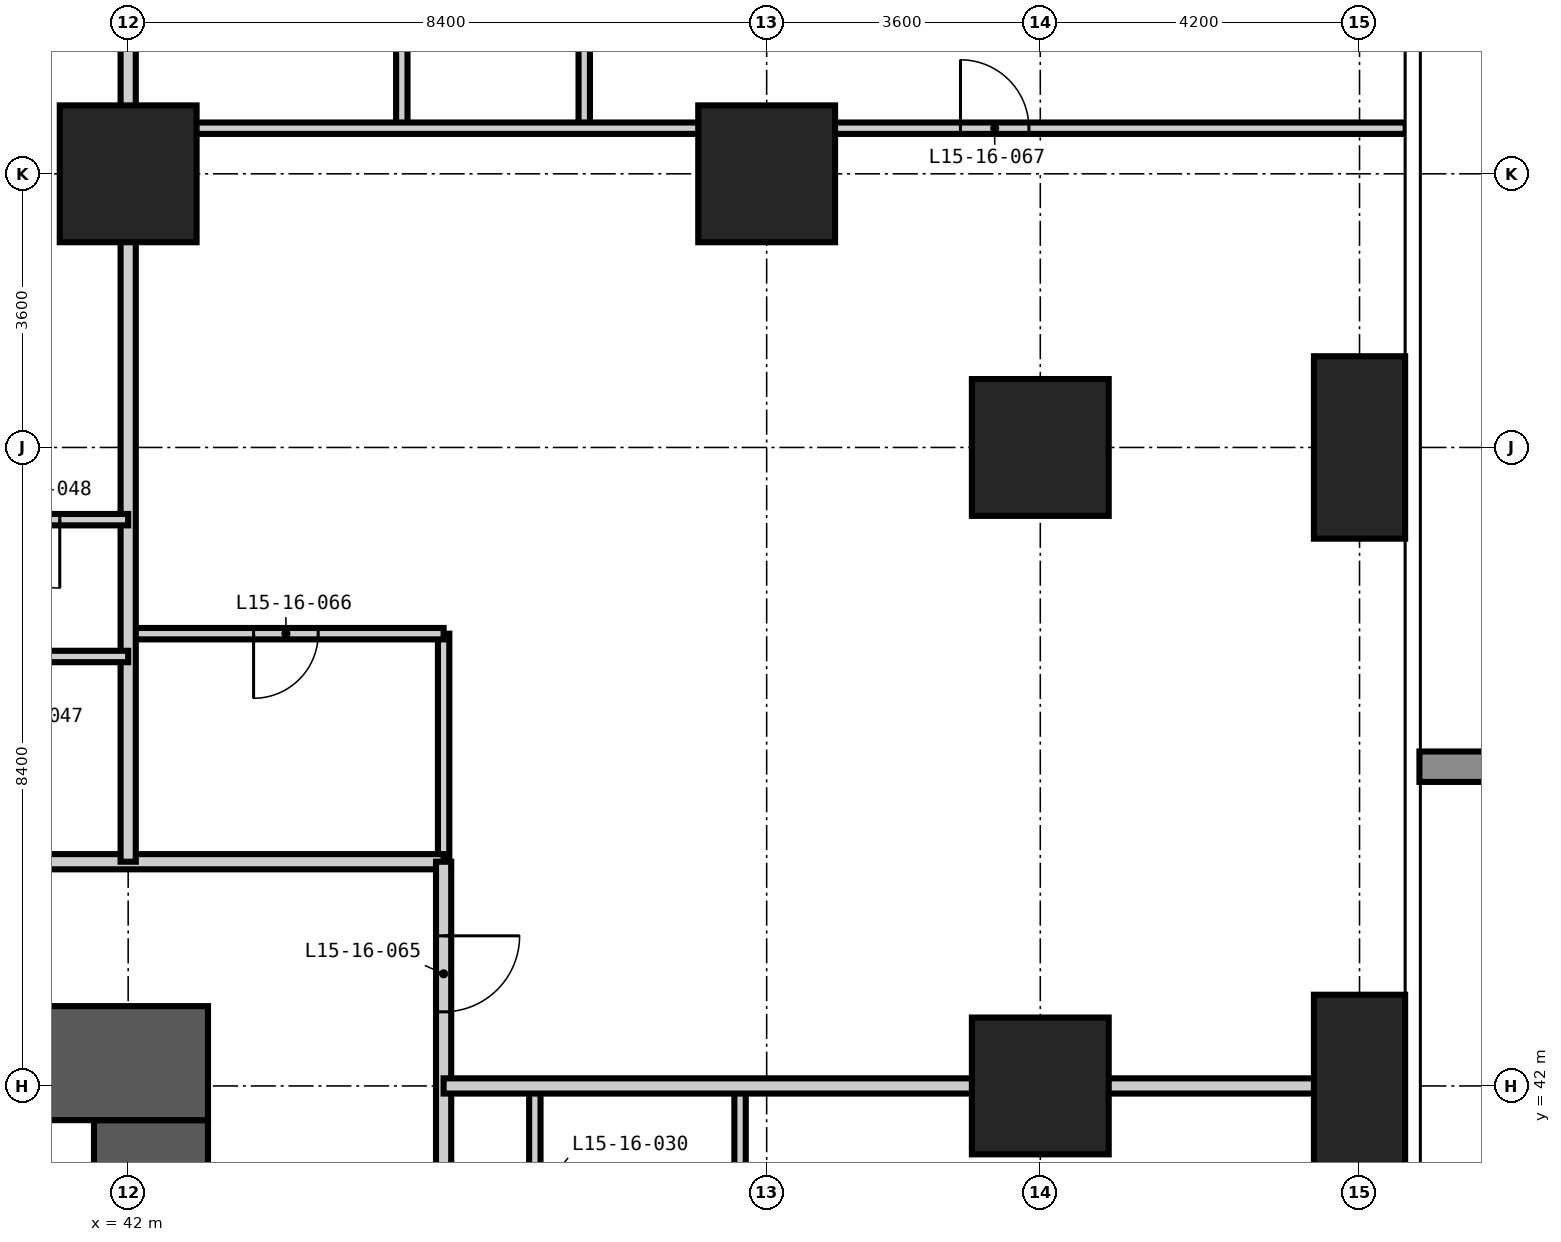
"""IFC4 building model, lengths in metres.
Left out: names, types, materials, properties, quantities, classifications, styles, units other than length and angle.
Written with IfcOpenShell. Run it as: python <this file> out.ifc"""

import sys

from ifc_helpers import new_model, si_unit, direction, frame, frame_2d, origin, origin_2d, place, context, subcontext, project, spatial, rectangle, extrude, element, fill, save


model = new_model("IFC4")
c1 = context("Model", 3, precision=1e-05, world=origin(), true_north=direction((0.0, 1.0)))
c2 = subcontext(c1, "Body", "Model", "MODEL_VIEW")
j1 = project(units=[si_unit("LENGTHUNIT", "METRE"), si_unit("PLANEANGLEUNIT", "RADIAN")], contexts=[c1])
p1 = place(None, origin())
s1 = spatial("IfcSite", under=j1, at=p1, CompositionType="ELEMENT")
p2 = place(p1, origin())
s2 = spatial("IfcBuilding", under=s1, at=p2, CompositionType="ELEMENT")
p3 = place(p2, frame((0.0, 0.0, 63.0)))
s3 = spatial("IfcBuildingStorey", under=s2, at=p3, CompositionType="ELEMENT", Elevation=63.0)
for number, where, z_axis, x_axis in (
    (1, (42.0, 54.0, -0.35), (0.0, 0.0, 1.0), (1.0, 0.0, 0.0)),
    (2, (50.4, 54.0, -0.35), (0.0, 0.0, 1.0), (1.0, 0.0, 0.0)),
    (3, (54.0, 42.0, -0.35), (0.0, 0.0, 1.0), (1.0, 0.0, 0.0)),
    (4, (54.0, 50.4, -0.35), (0.0, 0.0, 1.0), (1.0, 0.0, 0.0)),
):
    element("IfcColumn", number, at=place(p3, frame(where, z_axis=z_axis, x_axis=x_axis)), inside=s3, PredefinedType="COLUMN", context=c2, shape_type="SweptSolid", body=[
        extrude(rectangle(XDim=1.8, YDim=1.8, at=origin_2d()), origin(), (0.0, 0.0, 1.0), 3.6),
    ])
for number, where, z_axis, x_axis in (
    (5, (58.2, 42.0, -0.35), (0.0, 0.0, 1.0), (1.0, 0.0, 0.0)),
    (6, (58.2, 50.4, -0.35), (0.0, 0.0, 1.0), (1.0, 0.0, 0.0)),
):
    element("IfcColumn", number, at=place(p3, frame(where, z_axis=z_axis, x_axis=x_axis)), inside=s3, PredefinedType="COLUMN", context=c2, shape_type="SweptSolid", body=[
        extrude(rectangle(XDim=1.2, YDim=2.4, at=origin_2d()), origin(), (0.0, 0.0, 1.0), 3.6),
    ])
p4 = place(p3, frame((42.3, 17.25, -0.35), z_axis=(0.0, 0.0, 1.0), x_axis=(0.0, 1.0, 0.0)))
e7 = element("IfcWall", 7, at=p4, inside=s3, PredefinedType="SHEAR", context=c2, shape_type="SweptSolid", body=[
    extrude(rectangle(XDim=24.3, YDim=1.5, at=frame_2d((12.15, 0.0))), origin(), (0.0, 0.0, 1.0), 3.6),
])
p5 = place(p4, frame((0.35, 0.0, 0.35)))
e8 = element("IfcOpeningElement", 8, at=p5, cuts=e7, PredefinedType="OPENING", context=c2, shape_type="SweptSolid", body=[
    extrude(rectangle(XDim=1.2, YDim=2.2, at=frame_2d((0.6, 1.1))), frame((0.0, 0.76, 0.0), z_axis=(0.0, -1.0, 0.0), x_axis=(1.0, 0.0, 0.0)), (0.0, 0.0, 1.0), 1.52),
])
p6 = place(p4, frame((11.65, 0.0, 0.35)))
e9 = element("IfcOpeningElement", 9, at=p6, cuts=e7, PredefinedType="OPENING", context=c2, shape_type="SweptSolid", body=[
    extrude(rectangle(XDim=1.0, YDim=2.1, at=frame_2d((0.5, 1.05))), frame((0.0, 0.76, 0.0), z_axis=(0.0, -1.0, 0.0), x_axis=(1.0, 0.0, 0.0)), (0.0, 0.0, 1.0), 1.52),
])
p7 = place(p4, frame((20.05, 0.0, 0.35)))
e10 = element("IfcOpeningElement", 10, at=p7, cuts=e7, PredefinedType="OPENING", context=c2, shape_type="SweptSolid", body=[
    extrude(rectangle(XDim=1.0, YDim=2.1, at=frame_2d((0.5, 1.05))), frame((0.0, 0.76, 0.0), z_axis=(0.0, -1.0, 0.0), x_axis=(1.0, 0.0, 0.0)), (0.0, 0.0, 1.0), 1.52),
])
p8 = place(p3, frame((43.05, 42.3, -0.35), z_axis=(0.0, 0.0, 1.0), x_axis=(-1.0, 0.0, 0.0)))
e11 = element("IfcWall", 11, at=p8, inside=s3, PredefinedType="SHEAR", context=c2, shape_type="SweptSolid", body=[
    extrude(rectangle(XDim=27.3, YDim=1.5, at=frame_2d((13.65, 0.0))), origin(), (0.0, 0.0, 1.0), 3.6),
])
p9 = place(p8, frame((21.55, 0.0, 0.35)))
e12 = element("IfcOpeningElement", 12, at=p9, cuts=e11, PredefinedType="OPENING", context=c2, shape_type="SweptSolid", body=[
    extrude(rectangle(XDim=1.0, YDim=2.1, at=frame_2d((0.5, 1.05))), frame((0.0, 0.76, 0.0), z_axis=(0.0, -1.0, 0.0), x_axis=(1.0, 0.0, 0.0)), (0.0, 0.0, 1.0), 1.52),
])
p10 = place(p8, frame((10.95, 0.0, 0.35)))
e13 = element("IfcOpeningElement", 13, at=p10, cuts=e11, PredefinedType="OPENING", context=c2, shape_type="SweptSolid", body=[
    extrude(rectangle(XDim=1.2, YDim=2.2, at=frame_2d((0.6, 1.1))), frame((0.0, 0.76, 0.0), z_axis=(0.0, -1.0, 0.0), x_axis=(1.0, 0.0, 0.0)), (0.0, 0.0, 1.0), 1.52),
])
p11 = place(p3, frame((46.15, 44.95, 0.0), z_axis=(0.0, 0.0, 1.0), x_axis=(0.0, 1.0, 0.0)))
e14 = element("IfcWall", 14, at=p11, inside=s3, PredefinedType="PARTITIONING", context=c2, shape_type="SweptSolid", body=[
    extrude(rectangle(XDim=3.0, YDim=0.15, at=frame_2d((1.5, 0.0))), origin(), (0.0, 0.0, 1.0), 3.25),
])
p12 = place(p3, frame((47.35, 39.0, 0.0), z_axis=(0.0, 0.0, 1.0), x_axis=(0.0, 1.0, 0.0)))
e15 = element("IfcWall", 15, at=p12, inside=s3, PredefinedType="PARTITIONING", context=c2, shape_type="SweptSolid", body=[
    extrude(rectangle(XDim=3.0, YDim=0.15, at=frame_2d((1.5, 0.0))), origin(), (0.0, 0.0, 1.0), 3.25),
])
p13 = place(p12, frame((1.075, 0.0, 0.0)))
e16 = element("IfcOpeningElement", 16, at=p13, cuts=e15, PredefinedType="OPENING", context=c2, shape_type="SweptSolid", body=[
    extrude(rectangle(XDim=0.85, YDim=2.1, at=frame_2d((0.425, 1.05))), frame((0.0, 0.085, 0.0), z_axis=(0.0, -1.0, 0.0), x_axis=(1.0, 0.0, 0.0)), (0.0, 0.0, 1.0), 0.17),
])
p14 = place(p3, frame((50.05, 39.0, 0.0), z_axis=(0.0, 0.0, 1.0), x_axis=(0.0, 1.0, 0.0)))
e17 = element("IfcWall", 17, at=p14, inside=s3, PredefinedType="PARTITIONING", context=c2, shape_type="SweptSolid", body=[
    extrude(rectangle(XDim=3.0, YDim=0.15, at=frame_2d((1.5, 0.0))), origin(), (0.0, 0.0, 1.0), 3.25),
])
p15 = place(p3, frame((42.0, 47.95, 0.0), z_axis=(0.0, 0.0, 1.0), x_axis=(1.0, 0.0, 0.0)))
e18 = element("IfcWall", 18, at=p15, inside=s3, PredefinedType="PARTITIONING", context=c2, shape_type="SweptSolid", body=[
    extrude(rectangle(XDim=4.15, YDim=0.15, at=frame_2d((2.075, 0.0))), origin(), (0.0, 0.0, 1.0), 3.25),
])
p16 = place(p15, frame((1.65, 0.0, 0.0)))
e19 = element("IfcOpeningElement", 19, at=p16, cuts=e18, PredefinedType="OPENING", context=c2, shape_type="SweptSolid", body=[
    extrude(rectangle(XDim=0.85, YDim=2.1, at=frame_2d((0.425, 1.05))), frame((0.0, 0.085, 0.0), z_axis=(0.0, -1.0, 0.0), x_axis=(1.0, 0.0, 0.0)), (0.0, 0.0, 1.0), 0.17),
])
p17 = place(p3, frame((13.25, 44.95, 0.0), z_axis=(0.0, 0.0, 1.0), x_axis=(1.0, 0.0, 0.0)))
e20 = element("IfcWall", 20, at=p17, inside=s3, PredefinedType="PARTITIONING", context=c2, shape_type="SweptSolid", body=[
    extrude(rectangle(XDim=32.9, YDim=0.2, at=frame_2d((16.45, 0.0))), origin(), (0.0, 0.0, 1.0), 3.25),
])
p18 = place(p17, frame((6.5, 0.0, 0.0)))
e21 = element("IfcOpeningElement", 21, at=p18, cuts=e20, PredefinedType="OPENING", context=c2, shape_type="SweptSolid", body=[
    extrude(rectangle(XDim=1.0, YDim=2.2, at=frame_2d((0.5, 1.1))), frame((0.0, 0.11, 0.0), z_axis=(0.0, -1.0, 0.0), x_axis=(1.0, 0.0, 0.0)), (0.0, 0.0, 1.0), 0.22),
])
p19 = place(p17, frame((8.0, 0.0, 0.0)))
e22 = element("IfcOpeningElement", 22, at=p19, cuts=e20, PredefinedType="OPENING", context=c2, shape_type="SweptSolid", body=[
    extrude(rectangle(XDim=1.0, YDim=2.2, at=frame_2d((0.5, 1.1))), frame((0.0, 0.11, 0.0), z_axis=(0.0, -1.0, 0.0), x_axis=(1.0, 0.0, 0.0)), (0.0, 0.0, 1.0), 0.22),
])
p20 = place(p17, frame((14.9, 0.0, 0.0)))
e23 = element("IfcOpeningElement", 23, at=p20, cuts=e20, PredefinedType="OPENING", context=c2, shape_type="SweptSolid", body=[
    extrude(rectangle(XDim=1.0, YDim=2.2, at=frame_2d((0.5, 1.1))), frame((0.0, 0.11, 0.0), z_axis=(0.0, -1.0, 0.0), x_axis=(1.0, 0.0, 0.0)), (0.0, 0.0, 1.0), 0.22),
])
p21 = place(p17, frame((16.4, 0.0, 0.0)))
e24 = element("IfcOpeningElement", 24, at=p21, cuts=e20, PredefinedType="OPENING", context=c2, shape_type="SweptSolid", body=[
    extrude(rectangle(XDim=1.0, YDim=2.2, at=frame_2d((0.5, 1.1))), frame((0.0, 0.11, 0.0), z_axis=(0.0, -1.0, 0.0), x_axis=(1.0, 0.0, 0.0)), (0.0, 0.0, 1.0), 0.22),
])
p22 = place(p17, frame((23.3, 0.0, 0.0)))
e25 = element("IfcOpeningElement", 25, at=p22, cuts=e20, PredefinedType="OPENING", context=c2, shape_type="SweptSolid", body=[
    extrude(rectangle(XDim=1.0, YDim=2.2, at=frame_2d((0.5, 1.1))), frame((0.0, 0.11, 0.0), z_axis=(0.0, -1.0, 0.0), x_axis=(1.0, 0.0, 0.0)), (0.0, 0.0, 1.0), 0.22),
])
p23 = place(p17, frame((24.8, 0.0, 0.0)))
e26 = element("IfcOpeningElement", 26, at=p23, cuts=e20, PredefinedType="OPENING", context=c2, shape_type="SweptSolid", body=[
    extrude(rectangle(XDim=1.0, YDim=2.2, at=frame_2d((0.5, 1.1))), frame((0.0, 0.11, 0.0), z_axis=(0.0, -1.0, 0.0), x_axis=(1.0, 0.0, 0.0)), (0.0, 0.0, 1.0), 0.22),
])
p24 = place(p3, frame((46.15, 44.95, 0.0), z_axis=(0.0, 0.0, 1.0), x_axis=(0.0, -1.0, 0.0)))
e27 = element("IfcWall", 27, at=p24, inside=s3, PredefinedType="PARTITIONING", context=c2, shape_type="SweptSolid", body=[
    extrude(rectangle(XDim=31.7, YDim=0.2, at=frame_2d((15.85, 0.0))), origin(), (0.0, 0.0, 1.0), 3.25),
])
p25 = place(p24, frame((24.65, 0.0, 0.0)))
e28 = element("IfcOpeningElement", 28, at=p25, cuts=e27, PredefinedType="OPENING", context=c2, shape_type="SweptSolid", body=[
    extrude(rectangle(XDim=1.0, YDim=2.2, at=frame_2d((0.5, 1.1))), frame((0.0, 0.11, 0.0), z_axis=(0.0, -1.0, 0.0), x_axis=(1.0, 0.0, 0.0)), (0.0, 0.0, 1.0), 0.22),
])
p26 = place(p24, frame((13.85, 0.0, 0.0)))
e29 = element("IfcOpeningElement", 29, at=p26, cuts=e27, PredefinedType="OPENING", context=c2, shape_type="SweptSolid", body=[
    extrude(rectangle(XDim=1.0, YDim=2.2, at=frame_2d((0.5, 1.1))), frame((0.0, 0.11, 0.0), z_axis=(0.0, -1.0, 0.0), x_axis=(1.0, 0.0, 0.0)), (0.0, 0.0, 1.0), 0.22),
])
p27 = place(p24, frame((7.85, 0.0, 0.0)))
e30 = element("IfcOpeningElement", 30, at=p27, cuts=e27, PredefinedType="OPENING", context=c2, shape_type="SweptSolid", body=[
    extrude(rectangle(XDim=1.0, YDim=2.2, at=frame_2d((0.5, 1.1))), frame((0.0, 0.11, 0.0), z_axis=(0.0, -1.0, 0.0), x_axis=(1.0, 0.0, 0.0)), (0.0, 0.0, 1.0), 0.22),
])
p28 = place(p24, frame((29.425, 0.0, 0.0)))
e31 = element("IfcOpeningElement", 31, at=p28, cuts=e27, PredefinedType="OPENING", context=c2, shape_type="SweptSolid", body=[
    extrude(rectangle(XDim=1.0, YDim=2.2, at=frame_2d((0.5, 1.1))), frame((0.0, 0.11, 0.0), z_axis=(0.0, -1.0, 0.0), x_axis=(1.0, 0.0, 0.0)), (0.0, 0.0, 1.0), 0.22),
])
p29 = place(p24, frame((0.975, 0.0, 0.0)))
e32 = element("IfcOpeningElement", 32, at=p29, cuts=e27, PredefinedType="OPENING", context=c2, shape_type="SweptSolid", body=[
    extrude(rectangle(XDim=1.0, YDim=2.2, at=frame_2d((0.5, 1.1))), frame((0.0, 0.11, 0.0), z_axis=(0.0, -1.0, 0.0), x_axis=(1.0, 0.0, 0.0)), (0.0, 0.0, 1.0), 0.22),
])
p30 = place(p3, frame((42.0, 44.95, 0.0), z_axis=(0.0, 0.0, 1.0), x_axis=(0.0, 1.0, 0.0)))
e33 = element("IfcWall", 33, at=p30, inside=s3, PredefinedType="PARTITIONING", context=c2, shape_type="SweptSolid", body=[
    extrude(rectangle(XDim=13.858, YDim=0.2, at=frame_2d((6.929, 0.0))), origin(), (0.0, 0.0, 1.0), 3.25),
])
p31 = place(p3, frame((46.15, 42.0, 0.0), z_axis=(0.0, 0.0, 1.0), x_axis=(1.0, 0.0, 0.0)))
e34 = element("IfcWall", 34, at=p31, inside=s3, PredefinedType="PARTITIONING", context=c2, shape_type="SweptSolid", body=[
    extrude(rectangle(XDim=12.658, YDim=0.2, at=frame_2d((6.329, 0.0))), origin(), (0.0, 0.0, 1.0), 3.25),
])
p32 = place(p3, frame((45.6, 54.6, 0.0), z_axis=(0.0, 0.0, 1.0), x_axis=(0.0, 1.0, 0.0)))
e35 = element("IfcWall", 35, at=p32, inside=s3, PredefinedType="PARTITIONING", context=c2, shape_type="SweptSolid", body=[
    extrude(rectangle(XDim=3.0, YDim=0.15, at=frame_2d((1.5, 0.0))), origin(), (0.0, 0.0, 1.0), 3.25),
])
p33 = place(p3, frame((48.0, 54.6, 0.0), z_axis=(0.0, 0.0, 1.0), x_axis=(0.0, 1.0, 0.0)))
e36 = element("IfcWall", 36, at=p33, inside=s3, PredefinedType="PARTITIONING", context=c2, shape_type="SweptSolid", body=[
    extrude(rectangle(XDim=3.0, YDim=0.15, at=frame_2d((1.5, 0.0))), origin(), (0.0, 0.0, 1.0), 3.25),
])
p34 = place(p33, frame((1.05, 0.0, 0.0)))
e37 = element("IfcOpeningElement", 37, at=p34, cuts=e36, PredefinedType="OPENING", context=c2, shape_type="SweptSolid", body=[
    extrude(rectangle(XDim=0.9, YDim=2.1, at=frame_2d((0.45, 1.05))), frame((0.0, 0.085, 0.0), z_axis=(0.0, -1.0, 0.0), x_axis=(1.0, 0.0, 0.0)), (0.0, 0.0, 1.0), 0.17),
])
p35 = place(p3, frame((39.3, 47.65, 0.0), z_axis=(0.0, 0.0, 1.0), x_axis=(1.0, 0.0, 0.0)))
e38 = element("IfcWall", 38, at=p35, inside=s3, PredefinedType="PARTITIONING", context=c2, shape_type="SweptSolid", body=[
    extrude(rectangle(XDim=2.7, YDim=0.15, at=frame_2d((1.35, 0.0))), origin(), (0.0, 0.0, 1.0), 3.25),
])
p36 = place(p3, frame((39.3, 49.45, 0.0), z_axis=(0.0, 0.0, 1.0), x_axis=(1.0, 0.0, 0.0)))
e39 = element("IfcWall", 39, at=p36, inside=s3, PredefinedType="PARTITIONING", context=c2, shape_type="SweptSolid", body=[
    extrude(rectangle(XDim=2.7, YDim=0.15, at=frame_2d((1.35, 0.0))), origin(), (0.0, 0.0, 1.0), 3.25),
])
p37 = place(p36, frame((0.9, 0.0, 0.0)))
e40 = element("IfcOpeningElement", 40, at=p37, cuts=e39, PredefinedType="OPENING", context=c2, shape_type="SweptSolid", body=[
    extrude(rectangle(XDim=0.9, YDim=2.1, at=frame_2d((0.45, 1.05))), frame((0.0, 0.085, 0.0), z_axis=(0.0, -1.0, 0.0), x_axis=(1.0, 0.0, 0.0)), (0.0, 0.0, 1.0), 0.17),
])
p38 = place(p3, frame((42.0, 54.6, 0.0), z_axis=(0.0, 0.0, 1.0), x_axis=(1.0, 0.0, 0.0)))
e41 = element("IfcWall", 41, at=p38, inside=s3, PredefinedType="PARTITIONING", context=c2, shape_type="SweptSolid", body=[
    extrude(rectangle(XDim=16.808, YDim=0.15, at=frame_2d((8.404, 0.0))), origin(), (0.0, 0.0, 1.0), 3.25),
])
p39 = place(p38, frame((10.95, 0.0, 0.0)))
e42 = element("IfcOpeningElement", 42, at=p39, cuts=e41, PredefinedType="OPENING", context=c2, shape_type="SweptSolid", body=[
    extrude(rectangle(XDim=0.9, YDim=2.1, at=frame_2d((0.45, 1.05))), frame((0.0, 0.085, 0.0), z_axis=(0.0, -1.0, 0.0), x_axis=(1.0, 0.0, 0.0)), (0.0, 0.0, 1.0), 0.17),
])
p40 = place(p37, frame((0.9, 0.0, 0.0), z_axis=(0.0, 0.0, 1.0), x_axis=(-1.0, 0.0, 0.0)))
e43 = element("IfcDoor", 43, at=p40, inside=s3, OperationType="SINGLE_SWING_LEFT", PredefinedType="DOOR", context=c2, shape_type="SweptSolid", body=[
    extrude(rectangle(XDim=0.9, YDim=2.1, at=frame_2d((0.45, 1.05))), frame((0.0, 0.025, 0.0), z_axis=(0.0, -1.0, 0.0), x_axis=(1.0, 0.0, 0.0)), (0.0, 0.0, 1.0), 0.05),
])
fill(e40, e43)
p41 = place(p29, origin())
e44 = element("IfcDoor", 44, at=p41, inside=s3, OperationType="SINGLE_SWING_LEFT", PredefinedType="DOOR", context=c2, shape_type="SweptSolid", body=[
    extrude(rectangle(XDim=1.0, YDim=2.2, at=frame_2d((0.5, 1.1))), frame((0.0, 0.025, 0.0), z_axis=(0.0, -1.0, 0.0), x_axis=(1.0, 0.0, 0.0)), (0.0, 0.0, 1.0), 0.05),
])
fill(e32, e44)
p42 = place(p16, frame((0.85, 0.0, 0.0), z_axis=(0.0, 0.0, 1.0), x_axis=(-1.0, 0.0, 0.0)))
e45 = element("IfcDoor", 45, at=p42, inside=s3, OperationType="SINGLE_SWING_RIGHT", PredefinedType="DOOR", context=c2, shape_type="SweptSolid", body=[
    extrude(rectangle(XDim=0.85, YDim=2.1, at=frame_2d((0.425, 1.05))), frame((0.0, 0.025, 0.0), z_axis=(0.0, -1.0, 0.0), x_axis=(1.0, 0.0, 0.0)), (0.0, 0.0, 1.0), 0.05),
])
fill(e19, e45)
p43 = place(p39, origin())
e46 = element("IfcDoor", 46, at=p43, inside=s3, OperationType="SINGLE_SWING_LEFT", PredefinedType="DOOR", context=c2, shape_type="SweptSolid", body=[
    extrude(rectangle(XDim=0.9, YDim=2.1, at=frame_2d((0.45, 1.05))), frame((0.0, 0.025, 0.0), z_axis=(0.0, -1.0, 0.0), x_axis=(1.0, 0.0, 0.0)), (0.0, 0.0, 1.0), 0.05),
])
fill(e42, e46)
save(model, sys.argv[1])
